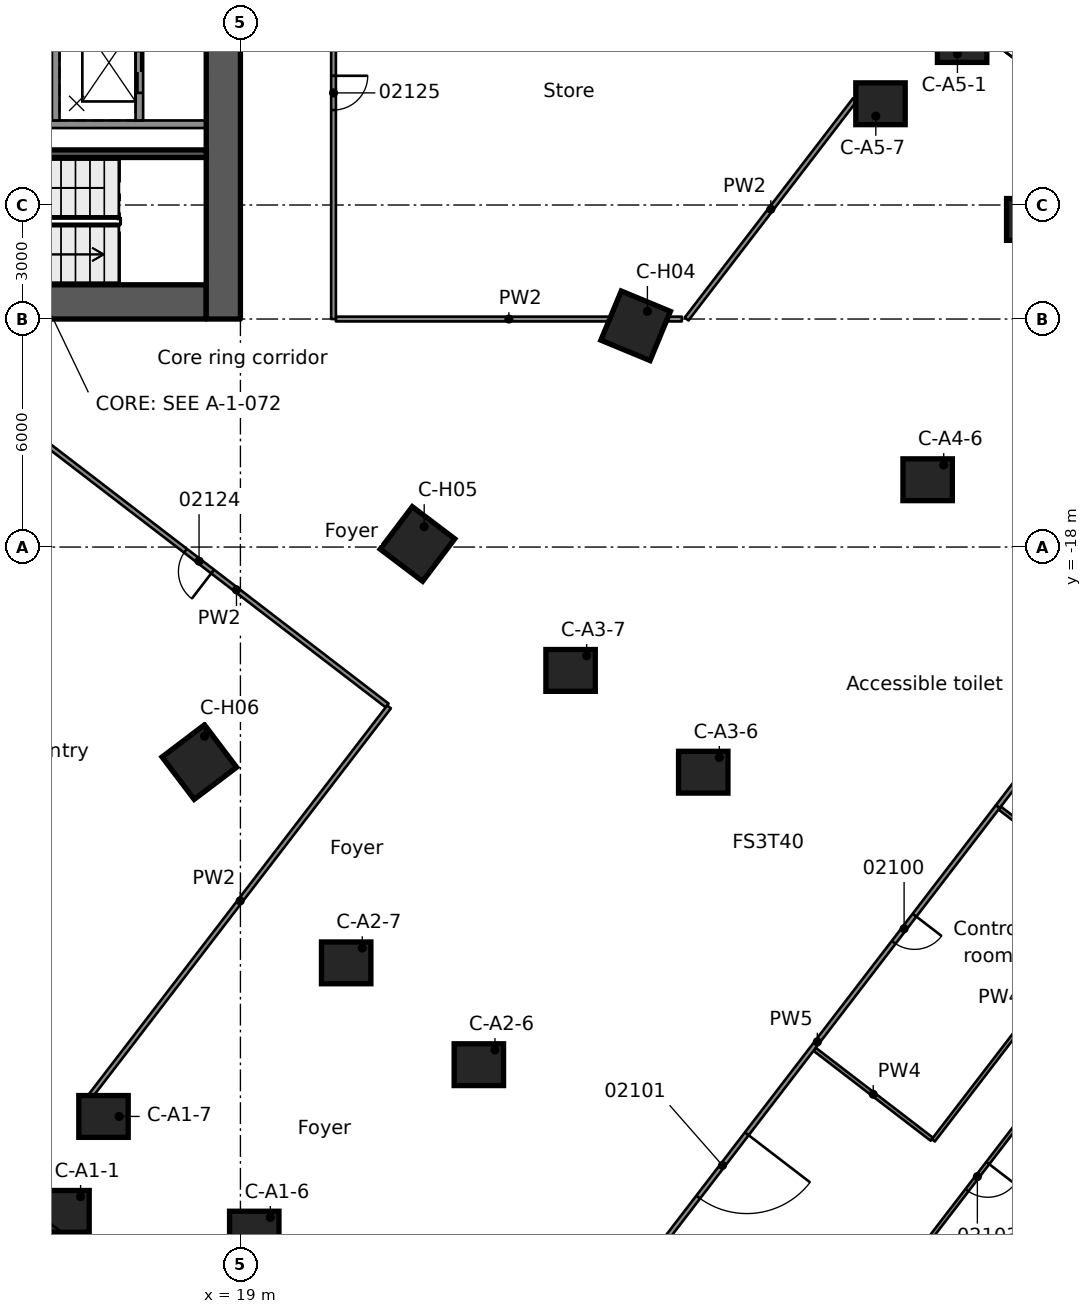
"""IFC4 building model, lengths in metres.
Left out: names, types, materials, properties, quantities, classifications, styles, units other than length and angle.
Written with IfcOpenShell. Run it as: python <this file> out.ifc"""

import sys

from ifc_helpers import new_model, si_unit, direction, frame, frame_2d, origin, origin_2d, place, context, subcontext, project, spatial, rectangle, extrude, element, fill, save


model = new_model("IFC4")
c1 = context("Model", 3, precision=1e-05, world=origin(), true_north=direction((0.0, 1.0)))
c2 = subcontext(c1, "Body", "Model", "MODEL_VIEW")
j1 = project(units=[si_unit("LENGTHUNIT", "METRE"), si_unit("PLANEANGLEUNIT", "RADIAN")], contexts=[c1])
p1 = place(None, origin())
s1 = spatial("IfcSite", under=j1, at=p1, CompositionType="ELEMENT")
p2 = place(p1, origin())
s2 = spatial("IfcBuilding", under=s1, at=p2, CompositionType="ELEMENT")
p3 = place(p2, frame((0.0, 0.0, 10.5)))
s3 = spatial("IfcBuildingStorey", under=s2, at=p3, CompositionType="ELEMENT", Elevation=10.5)
p4 = place(p3, frame((8.9, -11.55, 0.0), z_axis=(0.0, 0.0, 1.0), x_axis=(1.0, 0.0, 0.0)))
e1 = element("IfcWall", 1, at=p4, inside=s3, PredefinedType="SHEAR", context=c2, shape_type="SweptSolid", body=[
    extrude(rectangle(XDim=9.2, YDim=0.9, at=frame_2d((4.6, 0.0))), origin(), (0.0, 0.0, 1.0), 5.0),
])
p5 = place(p4, frame((3.0, 0.0, 0.0)))
e2 = element("IfcOpeningElement", 2, at=p5, cuts=e1, PredefinedType="OPENING", context=c2, shape_type="SweptSolid", body=[
    extrude(rectangle(XDim=1.1, YDim=2.1, at=frame_2d((0.55, 1.05))), frame((0.0, 0.46, 0.0), z_axis=(0.0, -1.0, 0.0), x_axis=(1.0, 0.0, 0.0)), (0.0, 0.0, 1.0), 0.92),
])
p6 = place(p3, frame((18.55, -12.0, 0.0), z_axis=(0.0, 0.0, 1.0), x_axis=(0.0, 1.0, 0.0)))
e3 = element("IfcWall", 3, at=p6, inside=s3, PredefinedType="SHEAR", context=c2, shape_type="SweptSolid", body=[
    extrude(rectangle(XDim=24.0, YDim=0.9, at=frame_2d((12.0, 0.0))), origin(), (0.0, 0.0, 1.0), 5.0),
])
p7 = place(p6, frame((12.1, 0.0, 0.0)))
e4 = element("IfcOpeningElement", 4, at=p7, cuts=e3, PredefinedType="OPENING", context=c2, shape_type="SweptSolid", body=[
    extrude(rectangle(XDim=1.8, YDim=2.1, at=frame_2d((0.9, 1.05))), frame((0.0, 0.46, 0.0), z_axis=(0.0, -1.0, 0.0), x_axis=(1.0, 0.0, 0.0)), (0.0, 0.0, 1.0), 0.92),
])
p8 = place(p3, frame((14.371, -35.48, -1.0), z_axis=(0.0, 0.0, 1.0), x_axis=(0.707106781187, 0.707106781187, 0.0)))
e5 = element("IfcColumn", 5, at=p8, inside=s3, PredefinedType="COLUMN", context=c2, shape_type="SweptSolid", body=[
    extrude(rectangle(XDim=2.4, YDim=2.4, at=origin_2d()), origin(), (0.0, 0.0, 1.0), 1.0),
])
p9 = place(p3, frame((19.364, -36.026, -1.0), z_axis=(0.0, 0.0, 1.0), x_axis=(0.707106781187, 0.707106781187, 0.0)))
e6 = element("IfcColumn", 6, at=p9, inside=s3, PredefinedType="COLUMN", context=c2, shape_type="SweptSolid", body=[
    extrude(rectangle(XDim=3.4, YDim=3.4, at=origin_2d()), origin(), (0.0, 0.0, 1.0), 1.0),
])
p10 = place(p3, frame((15.397, -32.982, -1.0), z_axis=(0.0, 0.0, 1.0), x_axis=(0.707106781187, 0.707106781187, 0.0)))
e7 = element("IfcColumn", 7, at=p10, inside=s3, PredefinedType="COLUMN", context=c2, shape_type="SweptSolid", body=[
    extrude(rectangle(XDim=2.4, YDim=2.4, at=origin_2d()), origin(), (0.0, 0.0, 1.0), 1.0),
])
for number, where, z_axis, x_axis in (
    (8, (27.389, -33.243, -1.0), (0.0, 0.0, 1.0), (0.707, 0.707, 0.0)),
    (9, (25.274, -31.62, -1.0), (0.0, 0.0, 1.0), (0.707, 0.707, 0.0)),
):
    element("IfcColumn", number, at=place(p3, frame(where, z_axis=z_axis, x_axis=x_axis)), inside=s3, PredefinedType="COLUMN", context=c2, shape_type="SweptSolid", body=[
        extrude(rectangle(XDim=2.55, YDim=2.55, at=origin_2d()), origin(), (0.0, 0.0, 1.0), 1.0),
    ])
p11 = place(p3, frame((21.783, -28.941, -1.0), z_axis=(0.0, 0.0, 1.0), x_axis=(0.707106781187, 0.707106781187, 0.0)))
e10 = element("IfcColumn", 10, at=p11, inside=s3, PredefinedType="COLUMN", context=c2, shape_type="SweptSolid", body=[
    extrude(rectangle(XDim=3.4, YDim=3.4, at=origin_2d()), origin(), (0.0, 0.0, 1.0), 1.0),
])
p12 = place(p3, frame((33.294, -25.548, -1.0), z_axis=(0.0, 0.0, 1.0), x_axis=(0.707106781187, 0.707106781187, 0.0)))
e11 = element("IfcColumn", 11, at=p12, inside=s3, PredefinedType="COLUMN", context=c2, shape_type="SweptSolid", body=[
    extrude(rectangle(XDim=2.55, YDim=2.55, at=origin_2d()), origin(), (0.0, 0.0, 1.0), 1.0),
])
p13 = place(p3, frame((40.408, -31.006, -1.0), z_axis=(0.0, 0.0, 1.0), x_axis=(0.707106781187, 0.707106781187, 0.0)))
e12 = element("IfcColumn", 12, at=p13, inside=s3, PredefinedType="COLUMN", context=c2, shape_type="SweptSolid", body=[
    extrude(rectangle(XDim=3.4, YDim=3.4, at=origin_2d()), origin(), (0.0, 0.0, 1.0), 1.0),
])
p14 = place(p3, frame((31.179, -23.924, -1.0), z_axis=(0.0, 0.0, 1.0), x_axis=(0.707106781187, 0.707106781187, 0.0)))
e13 = element("IfcColumn", 13, at=p14, inside=s3, PredefinedType="COLUMN", context=c2, shape_type="SweptSolid", body=[
    extrude(rectangle(XDim=2.55, YDim=2.55, at=origin_2d()), origin(), (0.0, 0.0, 1.0), 1.0),
])
p15 = place(p3, frame((27.688, -21.246, -1.0), z_axis=(0.0, 0.0, 1.0), x_axis=(0.707106781187, 0.707106781187, 0.0)))
e14 = element("IfcColumn", 14, at=p15, inside=s3, PredefinedType="COLUMN", context=c2, shape_type="SweptSolid", body=[
    extrude(rectangle(XDim=3.4, YDim=3.4, at=origin_2d()), origin(), (0.0, 0.0, 1.0), 1.0),
])
for number, where, z_axis, x_axis in (
    (15, (39.199, -17.852, -1.0), (0.0, 0.0, 1.0), (0.707, 0.707, 0.0)),
    (16, (37.084, -16.229, -1.0), (0.0, 0.0, 1.0), (0.707, 0.707, 0.0)),
):
    element("IfcColumn", number, at=place(p3, frame(where, z_axis=z_axis, x_axis=x_axis)), inside=s3, PredefinedType="COLUMN", context=c2, shape_type="SweptSolid", body=[
        extrude(rectangle(XDim=2.55, YDim=2.55, at=origin_2d()), origin(), (0.0, 0.0, 1.0), 1.0),
    ])
p16 = place(p3, frame((37.991, -4.698, -1.0), z_axis=(0.0, 0.0, 1.0), x_axis=(0.707106781187, 0.707106781187, 0.0)))
e17 = element("IfcColumn", 17, at=p16, inside=s3, PredefinedType="COLUMN", context=c2, shape_type="SweptSolid", body=[
    extrude(rectangle(XDim=2.6, YDim=2.6, at=origin_2d()), origin(), (0.0, 0.0, 1.0), 1.0),
])
p17 = place(p3, frame((39.81, -9.38, -1.0), z_axis=(0.0, 0.0, 1.0), x_axis=(0.707106781187, 0.707106781187, 0.0)))
e18 = element("IfcColumn", 18, at=p17, inside=s3, PredefinedType="COLUMN", context=c2, shape_type="SweptSolid", body=[
    extrude(rectangle(XDim=3.4, YDim=3.4, at=origin_2d()), origin(), (0.0, 0.0, 1.0), 1.0),
])
p18 = place(p3, frame((35.843, -6.336, -1.0), z_axis=(0.0, 0.0, 1.0), x_axis=(0.707106781187, 0.707106781187, 0.0)))
e19 = element("IfcColumn", 19, at=p18, inside=s3, PredefinedType="COLUMN", context=c2, shape_type="SweptSolid", body=[
    extrude(rectangle(XDim=2.6, YDim=2.6, at=origin_2d()), origin(), (0.0, 0.0, 1.0), 1.0),
])
for number, where, z_axis, x_axis in (
    (20, (29.4, -4.059, -1.0), (0.0, 0.0, 1.0), (0.707, 0.707, 0.0)),
    (21, (29.4, -12.178, -1.0), (0.0, 0.0, 1.0), (0.707, 0.707, 0.0)),
    (22, (23.659, -17.919, -1.0), (0.0, 0.0, 1.0), (0.707, 0.707, 0.0)),
    (23, (17.919, -23.659, -1.0), (0.0, 0.0, 1.0), (0.707, 0.707, 0.0)),
    (24, (12.178, -29.4, -1.0), (0.0, 0.0, 1.0), (0.707, 0.707, 0.0)),
):
    element("IfcColumn", number, at=place(p3, frame(where, z_axis=z_axis, x_axis=x_axis)), inside=s3, PredefinedType="COLUMN", context=c2, shape_type="SweptSolid", body=[
        extrude(rectangle(XDim=3.4, YDim=3.4, at=origin_2d()), origin(), (0.0, 0.0, 1.0), 1.0),
    ])
for number, where, z_axis, x_axis in (
    (25, (14.371, -35.48, 0.0), (0.0, 0.0, 1.0), (1.0, 0.0, 0.0)),
    (26, (19.364, -36.026, 0.0), (0.0, 0.0, 1.0), (1.0, 0.0, 0.0)),
    (27, (15.397, -32.982, 0.0), (0.0, 0.0, 1.0), (1.0, 0.0, 0.0)),
    (28, (25.274, -31.62, 0.0), (0.0, 0.0, 1.0), (1.0, 0.0, 0.0)),
    (29, (21.783, -28.941, 0.0), (0.0, 0.0, 1.0), (1.0, 0.0, 0.0)),
    (30, (31.179, -23.924, 0.0), (0.0, 0.0, 1.0), (1.0, 0.0, 0.0)),
    (31, (27.688, -21.246, 0.0), (0.0, 0.0, 1.0), (1.0, 0.0, 0.0)),
    (32, (37.084, -16.229, 0.0), (0.0, 0.0, 1.0), (1.0, 0.0, 0.0)),
    (33, (37.991, -4.698, 0.0), (0.0, 0.0, 1.0), (1.0, 0.0, 0.0)),
    (34, (39.81, -9.38, 0.0), (0.0, 0.0, 1.0), (1.0, 0.0, 0.0)),
    (35, (35.843, -6.336, 0.0), (0.0, 0.0, 1.0), (1.0, 0.0, 0.0)),
):
    element("IfcColumn", number, at=place(p3, frame(where, z_axis=z_axis, x_axis=x_axis)), inside=s3, PredefinedType="COLUMN", context=c2, shape_type="SweptSolid", body=[
        extrude(rectangle(XDim=1.3, YDim=1.1, at=origin_2d()), origin(), (0.0, 0.0, 1.0), 5.0),
    ])
for number, where, z_axis, x_axis in (
    (36, (29.4, -12.178, 0.0), (0.0, 0.0, 1.0), (0.924, -0.383, 0.0)),
    (37, (23.659, -17.919, 0.0), (0.0, 0.0, 1.0), (0.797, -0.604, 0.0)),
    (38, (17.919, -23.659, 0.0), (0.0, 0.0, 1.0), (0.604, -0.797, 0.0)),
):
    element("IfcColumn", number, at=place(p3, frame(where, z_axis=z_axis, x_axis=x_axis)), inside=s3, PredefinedType="COLUMN", context=c2, shape_type="SweptSolid", body=[
        extrude(rectangle(XDim=1.4, YDim=1.4, at=origin_2d()), origin(), (0.0, 0.0, 1.0), 5.0),
    ])
p19 = place(p3, frame((11.54, -6.875, 0.0), z_axis=(0.0, 0.0, 1.0), x_axis=(1.0, 0.0, 0.0)))
e39 = element("IfcWall", 39, at=p19, inside=s3, PredefinedType="SOLIDWALL", context=c2, shape_type="SweptSolid", body=[
    extrude(rectangle(XDim=6.56, YDim=0.2, at=frame_2d((3.28, 0.0))), origin(), (0.0, 0.0, 1.0), 4.59),
])
p20 = place(p3, frame((14.14, -4.225, 0.0), z_axis=(0.0, 0.0, 1.0), x_axis=(0.0, -1.0, 0.0)))
e40 = element("IfcWall", 40, at=p20, inside=s3, PredefinedType="SOLIDWALL", context=c2, shape_type="SweptSolid", body=[
    extrude(rectangle(XDim=2.55, YDim=0.2, at=frame_2d((1.275, 0.0))), origin(), (0.0, 0.0, 1.0), 4.59),
])
p21 = place(p3, frame((16.34, -4.025, 0.0), z_axis=(0.0, 0.0, 1.0), x_axis=(0.0, -1.0, 0.0)))
e41 = element("IfcWall", 41, at=p21, inside=s3, PredefinedType="SOLIDWALL", context=c2, shape_type="SweptSolid", body=[
    extrude(rectangle(XDim=2.75, YDim=0.2, at=frame_2d((1.375, 0.0))), origin(), (0.0, 0.0, 1.0), 4.59),
])
p22 = place(p21, frame((0.925, 0.0, 0.0)))
e42 = element("IfcOpeningElement", 42, at=p22, cuts=e41, PredefinedType="OPENING", context=c2, shape_type="SweptSolid", body=[
    extrude(rectangle(XDim=1.1, YDim=2.1, at=frame_2d((0.55, 1.05))), frame((0.0, 0.11, 0.0), z_axis=(0.0, -1.0, 0.0), x_axis=(1.0, 0.0, 0.0)), (0.0, 0.0, 1.0), 0.22),
])
p23 = place(p3, frame((11.54, -7.65, 0.0), z_axis=(0.0, 0.0, 1.0), x_axis=(1.0, 0.0, 0.0)))
e43 = element("IfcWall", 43, at=p23, inside=s3, PredefinedType="SOLIDWALL", context=c2, shape_type="SweptSolid", body=[
    extrude(rectangle(XDim=6.56, YDim=0.2, at=frame_2d((3.28, 0.0))), origin(), (0.0, 0.0, 1.0), 4.59),
])
p24 = place(p3, frame((34.11, -31.215, 0.0), z_axis=(0.0, 0.0, 1.0), x_axis=(0.793317087908, -0.608808671121, 0.0)))
e44 = element("IfcWall", 44, at=p24, inside=s3, PredefinedType="PARTITIONING", context=c2, shape_type="SweptSolid", body=[
    extrude(rectangle(XDim=3.886, YDim=0.1, at=frame_2d((1.943, 0.0))), origin(), (0.0, 0.0, 1.0), 9.6),
])
p25 = place(p3, frame((22.86, -22.168, 0.0), z_axis=(0.0, 0.0, 1.0), x_axis=(-0.793328204451, 0.608794185274, 0.0)))
e45 = element("IfcWall", 45, at=p25, inside=s3, PredefinedType="PARTITIONING", context=c2, shape_type="SweptSolid", body=[
    extrude(rectangle(XDim=12.492, YDim=0.125, at=frame_2d((6.246, 0.0))), origin(), (0.0, 0.0, 1.0), 4.58),
])
p26 = place(p25, frame((5.788, 0.0, 0.0)))
e46 = element("IfcOpeningElement", 46, at=p26, cuts=e45, PredefinedType="OPENING", context=c2, shape_type="SweptSolid", body=[
    extrude(rectangle(XDim=0.9, YDim=2.1, at=frame_2d((0.45, 1.05))), frame((0.0, 0.073, 0.0), z_axis=(0.0, -1.0, 0.0), x_axis=(1.0, 0.0, 0.0)), (0.0, 0.0, 1.0), 0.145),
])
p27 = place(p3, frame((38.98, -24.868, 0.0), z_axis=(0.0, 0.0, 1.0), x_axis=(0.793317087908, -0.608808671121, 0.0)))
e47 = element("IfcWall", 47, at=p27, inside=s3, PredefinedType="PARTITIONING", context=c2, shape_type="SweptSolid", body=[
    extrude(rectangle(XDim=3.886, YDim=0.1, at=frame_2d((1.943, 0.0))), origin(), (0.0, 0.0, 1.0), 9.6),
])
p28 = place(p3, frame((21.512, -12.0, 0.0), z_axis=(0.0, 0.0, 1.0), x_axis=(1.0, 0.0, 0.0)))
e48 = element("IfcWall", 48, at=p28, inside=s3, PredefinedType="PARTITIONING", context=c2, shape_type="SweptSolid", body=[
    extrude(rectangle(XDim=9.102, YDim=0.125, at=frame_2d((4.551, 0.0))), origin(), (0.0, 0.0, 1.0), 4.58),
])
p29 = place(p3, frame((51.571, -17.393, 0.0), z_axis=(0.0, 0.0, 1.0), x_axis=(-0.608824368929, -0.793305040825, 0.0)))
e49 = element("IfcWall", 49, at=p29, inside=s3, PredefinedType="PARTITIONING", context=c2, shape_type="SweptSolid", body=[
    extrude(rectangle(XDim=35.196, YDim=0.1, at=frame_2d((17.598, 0.0))), origin(), (0.0, 0.0, 1.0), 9.6),
])
p30 = place(p29, frame((21.197, 0.0, 0.0)))
e50 = element("IfcOpeningElement", 50, at=p30, cuts=e49, PredefinedType="OPENING", context=c2, shape_type="SweptSolid", body=[
    extrude(rectangle(XDim=0.9, YDim=2.1, at=frame_2d((0.45, 1.05))), frame((0.0, 0.06, 0.0), z_axis=(0.0, -1.0, 0.0), x_axis=(1.0, 0.0, 0.0)), (0.0, 0.0, 1.0), 0.12),
])
p31 = place(p29, frame((17.197, 0.0, 0.0)))
e51 = element("IfcOpeningElement", 51, at=p31, cuts=e49, PredefinedType="OPENING", context=c2, shape_type="SweptSolid", body=[
    extrude(rectangle(XDim=0.9, YDim=2.1, at=frame_2d((0.45, 1.05))), frame((0.0, 0.06, 0.0), z_axis=(0.0, -1.0, 0.0), x_axis=(1.0, 0.0, 0.0)), (0.0, 0.0, 1.0), 0.12),
])
p32 = place(p29, frame((30.946, 0.0, 0.0)))
e52 = element("IfcOpeningElement", 52, at=p32, cuts=e49, PredefinedType="OPENING", context=c2, shape_type="SweptSolid", body=[
    extrude(rectangle(XDim=0.9, YDim=2.1, at=frame_2d((0.45, 1.05))), frame((0.0, 0.06, 0.0), z_axis=(0.0, -1.0, 0.0), x_axis=(1.0, 0.0, 0.0)), (0.0, 0.0, 1.0), 0.12),
])
p33 = place(p29, frame((3.346, 0.0, 0.0)))
e53 = element("IfcOpeningElement", 53, at=p33, cuts=e49, PredefinedType="OPENING", context=c2, shape_type="SweptSolid", body=[
    extrude(rectangle(XDim=0.9, YDim=2.1, at=frame_2d((0.45, 1.05))), frame((0.0, 0.06, 0.0), z_axis=(0.0, -1.0, 0.0), x_axis=(1.0, 0.0, 0.0)), (0.0, 0.0, 1.0), 0.12),
])
p34 = place(p3, frame((37.233, -33.611, 0.0), z_axis=(0.0, 0.0, 1.0), x_axis=(0.608801811287, 0.793322352246, 0.0)))
e54 = element("IfcWall", 54, at=p34, inside=s3, PredefinedType="PARTITIONING", context=c2, shape_type="SweptSolid", body=[
    extrude(rectangle(XDim=8.0, YDim=0.1, at=frame_2d((4.0, 0.0))), origin(), (0.0, 0.0, 1.0), 9.6),
])
p35 = place(p3, frame((42.582, -20.07, 0.0), z_axis=(0.0, 0.0, 1.0), x_axis=(-0.608721107123, -0.793384278734, 0.0)))
e55 = element("IfcWall", 55, at=p35, inside=s3, PredefinedType="PARTITIONING", context=c2, shape_type="SweptSolid", body=[
    extrude(rectangle(XDim=6.0, YDim=0.125, at=frame_2d((3.0, 0.0))), origin(), (0.0, 0.0, 1.0), 4.58),
])
p36 = place(p35, frame((2.35, 0.0, 0.0)))
e56 = element("IfcOpeningElement", 56, at=p36, cuts=e55, PredefinedType="OPENING", context=c2, shape_type="SweptSolid", body=[
    extrude(rectangle(XDim=1.1, YDim=2.1, at=frame_2d((0.55, 1.05))), frame((0.0, 0.073, 0.0), z_axis=(0.0, -1.0, 0.0), x_axis=(1.0, 0.0, 0.0)), (0.0, 0.0, 1.0), 0.145),
])
p37 = place(p3, frame((38.929, -24.831, 0.0), z_axis=(0.0, 0.0, 1.0), x_axis=(-0.608738381153, -0.793371025001, 0.0)))
e57 = element("IfcWall", 57, at=p37, inside=s3, PredefinedType="PARTITIONING", context=c2, shape_type="SweptSolid", body=[
    extrude(rectangle(XDim=15.599, YDim=0.125, at=frame_2d((7.8, 0.0))), origin(), (0.0, 0.0, 1.0), 9.6),
])
p38 = place(p37, frame((3.599, 0.0, 0.0)))
e58 = element("IfcOpeningElement", 58, at=p38, cuts=e57, PredefinedType="OPENING", context=c2, shape_type="SweptSolid", body=[
    extrude(rectangle(XDim=0.9, YDim=2.1, at=frame_2d((0.45, 1.05))), frame((0.0, 0.073, 0.0), z_axis=(0.0, -1.0, 0.0), x_axis=(1.0, 0.0, 0.0)), (0.0, 0.0, 1.0), 0.145),
])
p39 = place(p37, frame((10.849, 0.0, 0.0)))
e59 = element("IfcOpeningElement", 59, at=p39, cuts=e57, PredefinedType="OPENING", context=c2, shape_type="SweptSolid", body=[
    extrude(rectangle(XDim=2.1, YDim=2.1, at=frame_2d((1.05, 1.05))), frame((0.0, 0.073, 0.0), z_axis=(0.0, -1.0, 0.0), x_axis=(1.0, 0.0, 0.0)), (0.0, 0.0, 1.0), 0.145),
])
p40 = place(p3, frame((15.078, -32.412, 0.0), z_axis=(0.0, 0.0, 1.0), x_axis=(0.608793231938, 0.793328936033, 0.0)))
e60 = element("IfcWall", 60, at=p40, inside=s3, PredefinedType="PARTITIONING", context=c2, shape_type="SweptSolid", body=[
    extrude(rectangle(XDim=12.865, YDim=0.125, at=frame_2d((6.432, 0.0))), origin(), (0.0, 0.0, 1.0), 4.58),
])
p41 = place(p3, frame((30.741, -12.0, 0.0), z_axis=(0.0, 0.0, 1.0), x_axis=(0.608773631009, 0.793343977218, 0.0)))
e61 = element("IfcWall", 61, at=p41, inside=s3, PredefinedType="PARTITIONING", context=c2, shape_type="SweptSolid", body=[
    extrude(rectangle(XDim=7.281, YDim=0.125, at=frame_2d((3.64, 0.0))), origin(), (0.0, 0.0, 1.0), 4.58),
])
p42 = place(p3, frame((21.45, 14.451, 0.0), z_axis=(0.0, 0.0, 1.0), x_axis=(0.0, -1.0, 0.0)))
e62 = element("IfcWall", 62, at=p42, inside=s3, PredefinedType="PARTITIONING", context=c2, shape_type="SweptSolid", body=[
    extrude(rectangle(XDim=26.451, YDim=0.125, at=frame_2d((13.226, 0.0))), origin(), (0.0, 0.0, 1.0), 4.58),
])
p43 = place(p42, frame((20.051, 0.0, 0.0)))
e63 = element("IfcOpeningElement", 63, at=p43, cuts=e62, PredefinedType="OPENING", context=c2, shape_type="SweptSolid", body=[
    extrude(rectangle(XDim=0.9, YDim=2.1, at=frame_2d((0.45, 1.05))), frame((0.0, 0.073, 0.0), z_axis=(0.0, -1.0, 0.0), x_axis=(1.0, 0.0, 0.0)), (0.0, 0.0, 1.0), 0.145),
])
p44 = place(p42, frame((7.801, 0.0, 0.0)))
e64 = element("IfcOpeningElement", 64, at=p44, cuts=e62, PredefinedType="OPENING", context=c2, shape_type="SweptSolid", body=[
    extrude(rectangle(XDim=1.1, YDim=2.1, at=frame_2d((0.55, 1.05))), frame((0.0, 0.073, 0.0), z_axis=(0.0, -1.0, 0.0), x_axis=(1.0, 0.0, 0.0)), (0.0, 0.0, 1.0), 0.145),
])
p45 = place(p22, origin())
e65 = element("IfcDoor", 65, at=p45, inside=s3, OperationType="DOUBLE_DOOR_SLIDING", PredefinedType="DOOR", context=c2, shape_type="SweptSolid", body=[
    extrude(rectangle(XDim=1.1, YDim=2.1, at=frame_2d((0.55, 1.05))), frame((0.0, 0.025, 0.0), z_axis=(0.0, -1.0, 0.0), x_axis=(1.0, 0.0, 0.0)), (0.0, 0.0, 1.0), 0.05),
])
fill(e42, e65)
p46 = place(p38, origin())
e66 = element("IfcDoor", 66, at=p46, inside=s3, OperationType="SINGLE_SWING_LEFT", PredefinedType="DOOR", context=c2, shape_type="SweptSolid", body=[
    extrude(rectangle(XDim=0.9, YDim=2.1, at=frame_2d((0.45, 1.05))), frame((0.0, 0.025, 0.0), z_axis=(0.0, -1.0, 0.0), x_axis=(1.0, 0.0, 0.0)), (0.0, 0.0, 1.0), 0.05),
])
fill(e58, e66)
p47 = place(p39, origin())
e67 = element("IfcDoor", 67, at=p47, inside=s3, OperationType="DOUBLE_DOOR_SINGLE_SWING", PredefinedType="DOOR", context=c2, shape_type="SweptSolid", body=[
    extrude(rectangle(XDim=2.1, YDim=2.1, at=frame_2d((1.05, 1.05))), frame((0.0, 0.025, 0.0), z_axis=(0.0, -1.0, 0.0), x_axis=(1.0, 0.0, 0.0)), (0.0, 0.0, 1.0), 0.05),
])
fill(e59, e67)
p48 = place(p30, origin())
e68 = element("IfcDoor", 68, at=p48, inside=s3, OperationType="SINGLE_SWING_RIGHT", PredefinedType="DOOR", context=c2, shape_type="SweptSolid", body=[
    extrude(rectangle(XDim=0.9, YDim=2.1, at=frame_2d((0.45, 1.05))), frame((0.0, 0.025, 0.0), z_axis=(0.0, -1.0, 0.0), x_axis=(1.0, 0.0, 0.0)), (0.0, 0.0, 1.0), 0.05),
])
fill(e50, e68)
p49 = place(p26, origin())
e69 = element("IfcDoor", 69, at=p49, inside=s3, OperationType="SINGLE_SWING_LEFT", PredefinedType="DOOR", context=c2, shape_type="SweptSolid", body=[
    extrude(rectangle(XDim=0.9, YDim=2.1, at=frame_2d((0.45, 1.05))), frame((0.0, 0.025, 0.0), z_axis=(0.0, -1.0, 0.0), x_axis=(1.0, 0.0, 0.0)), (0.0, 0.0, 1.0), 0.05),
])
fill(e46, e69)
p50 = place(p43, origin())
e70 = element("IfcDoor", 70, at=p50, inside=s3, OperationType="SINGLE_SWING_RIGHT", PredefinedType="DOOR", context=c2, shape_type="SweptSolid", body=[
    extrude(rectangle(XDim=0.9, YDim=2.1, at=frame_2d((0.45, 1.05))), frame((0.0, 0.025, 0.0), z_axis=(0.0, -1.0, 0.0), x_axis=(1.0, 0.0, 0.0)), (0.0, 0.0, 1.0), 0.05),
])
fill(e63, e70)
save(model, sys.argv[1])
